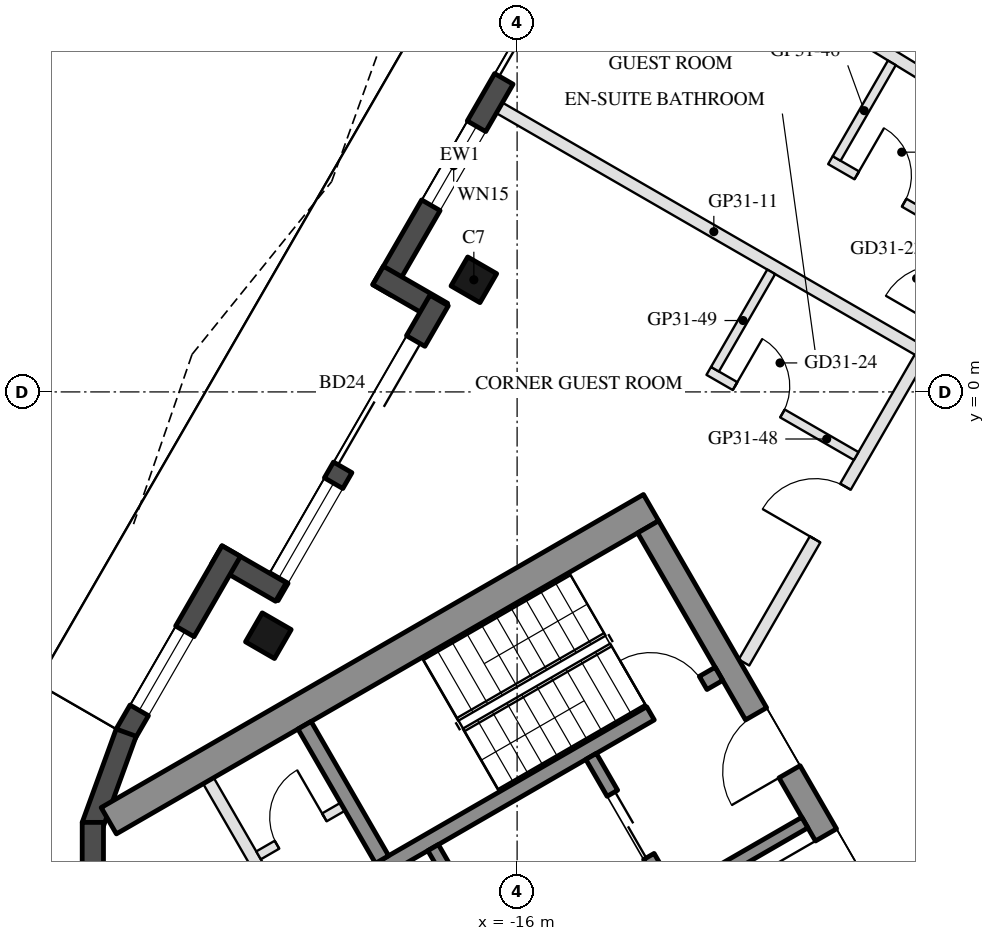
"""IFC4 building model, lengths in metres.
Left out: names, types, materials, properties, quantities, classifications, styles, units other than length and angle.
Written with IfcOpenShell. Run it as: python <this file> out.ifc"""

import sys

from ifc_helpers import new_model, si_unit, direction, frame, frame_2d, origin, origin_2d, place, context, subcontext, project, spatial, rectangle, hollow_rectangle, extrude, boolean, halfspace, element, fill, save


model = new_model("IFC4")
c1 = context("Model", 3, precision=1e-05, world=origin(), true_north=direction((0.0, 1.0)))
c2 = subcontext(c1, "Body", "Model", "MODEL_VIEW")
j1 = project(units=[si_unit("LENGTHUNIT", "METRE"), si_unit("PLANEANGLEUNIT", "RADIAN")], contexts=[c1])
p1 = place(None, origin())
s1 = spatial("IfcSite", under=j1, at=p1, CompositionType="ELEMENT")
p2 = place(p1, origin())
s2 = spatial("IfcBuilding", under=s1, at=p2, CompositionType="ELEMENT")
p3 = place(p2, frame((0.0, 0.0, 305.9)))
s3 = spatial("IfcBuildingStorey", under=s2, at=p3, CompositionType="ELEMENT", Elevation=305.9)
p4 = place(p3, frame((-16.711, 1.844, 0.0), z_axis=(0.0, 0.0, 1.0), x_axis=(0.5, 0.866025403784, 0.0)))
e1 = element("IfcColumn", 1, at=p4, inside=s3, PredefinedType="COLUMN", context=c2, shape_type="SweptSolid", body=[
    boolean("DIFFERENCE", extrude(hollow_rectangle(XDim=0.55, YDim=0.55, WallThickness=0.025, at=origin_2d()), origin(), (0.0, 0.0, 1.0), 3.7), halfspace(frame((0.0, 0.0, 3.666), z_axis=(0.0, 0.0, 1.0), x_axis=(1.0, 0.0, 0.0)), False)),
])
p5 = place(p3, frame((-20.091, -4.01, 0.0), z_axis=(0.0, 0.0, 1.0), x_axis=(0.5, 0.866025403784, 0.0)))
e2 = element("IfcColumn", 2, at=p5, inside=s3, PredefinedType="COLUMN", context=c2, shape_type="SweptSolid", body=[
    boolean("DIFFERENCE", extrude(hollow_rectangle(XDim=0.55, YDim=0.55, WallThickness=0.025, at=origin_2d()), origin(), (0.0, 0.0, 1.0), 3.7), halfspace(frame((0.0, 0.0, 3.66), z_axis=(0.0, 0.0, 1.0), x_axis=(1.0, 0.0, 0.0)), False)),
])
p6 = place(p3, frame((-13.943, 9.089, 0.0), z_axis=(0.0, 0.0, 1.0), x_axis=(-0.500013816581, -0.866017426631, 0.0)))
e3 = element("IfcWall", 3, at=p6, inside=s3, PredefinedType="SOLIDWALL", context=c2, shape_type="SweptSolid", body=[
    extrude(rectangle(XDim=8.559, YDim=0.35, at=frame_2d((4.279, 0.0))), origin(), (0.0, 0.0, 1.0), 3.55),
])
p7 = place(p6, frame((2.75, 0.0, 0.0)))
e4 = element("IfcOpeningElement", 4, at=p7, cuts=e3, PredefinedType="OPENING", context=c2, shape_type="SweptSolid", body=[
    extrude(rectangle(XDim=1.8, YDim=2.4, at=frame_2d((0.9, 1.2))), frame((0.0, 0.185, 0.0), z_axis=(0.0, -1.0, 0.0), x_axis=(1.0, 0.0, 0.0)), (0.0, 0.0, 1.0), 0.37),
])
p8 = place(p6, frame((1.525, 0.0, 0.3)))
e5 = element("IfcOpeningElement", 5, at=p8, cuts=e3, PredefinedType="OPENING", context=c2, shape_type="SweptSolid", body=[
    extrude(rectangle(XDim=0.9, YDim=2.65, at=frame_2d((0.45, 1.325))), frame((0.0, 0.185, 0.0), z_axis=(0.0, -1.0, 0.0), x_axis=(1.0, 0.0, 0.0)), (0.0, 0.0, 1.0), 0.37),
])
p9 = place(p6, frame((5.45, 0.0, 0.3)))
e6 = element("IfcOpeningElement", 6, at=p9, cuts=e3, PredefinedType="OPENING", context=c2, shape_type="SweptSolid", body=[
    extrude(rectangle(XDim=1.5, YDim=2.65, at=frame_2d((0.75, 1.325))), frame((0.0, 0.185, 0.0), z_axis=(0.0, -1.0, 0.0), x_axis=(1.0, 0.0, 0.0)), (0.0, 0.0, 1.0), 0.37),
])
p10 = place(p3, frame((-18.287, 1.916, 0.0), z_axis=(0.0, 0.0, 1.0), x_axis=(0.866142280446, -0.499797509021, 0.0)))
e7 = element("IfcWall", 7, at=p10, inside=s3, PredefinedType="SOLIDWALL", context=c2, shape_type="SweptSolid", body=[
    extrude(rectangle(XDim=1.22, YDim=0.35, at=frame_2d((0.61, 0.0))), origin(), (0.0, 0.0, 1.0), 3.55),
])
p11 = place(p3, frame((-17.283, 1.504, 0.0), z_axis=(0.0, 0.0, 1.0), x_axis=(-0.500008054862, -0.866020753258, 0.0)))
e8 = element("IfcWall", 8, at=p11, inside=s3, PredefinedType="SOLIDWALL", context=c2, shape_type="SweptSolid", body=[
    extrude(rectangle(XDim=5.599, YDim=0.35, at=frame_2d((2.8, 0.0))), origin(), (0.0, 0.0, 1.0), 3.55),
])
p12 = place(p11, frame((0.77, 0.0, 0.0)))
e9 = element("IfcOpeningElement", 9, at=p12, cuts=e8, PredefinedType="OPENING", context=c2, shape_type="SweptSolid", body=[
    extrude(rectangle(XDim=2.4, YDim=2.4, at=frame_2d((1.2, 1.2))), frame((0.0, 0.185, 0.0), z_axis=(0.0, -1.0, 0.0), x_axis=(1.0, 0.0, 0.0)), (0.0, 0.0, 1.0), 0.37),
])
p13 = place(p11, frame((3.47, 0.0, 0.3)))
e10 = element("IfcOpeningElement", 10, at=p13, cuts=e8, PredefinedType="OPENING", context=c2, shape_type="SweptSolid", body=[
    extrude(rectangle(XDim=1.8, YDim=2.65, at=frame_2d((0.9, 1.325))), frame((0.0, 0.185, 0.0), z_axis=(0.0, -1.0, 0.0), x_axis=(1.0, 0.0, 0.0)), (0.0, 0.0, 1.0), 0.37),
])
p14 = place(p3, frame((-19.884, -3.292, 0.0), z_axis=(0.0, 0.0, 1.0), x_axis=(-0.866005645448, 0.500034220881, 0.0)))
e11 = element("IfcWall", 11, at=p14, inside=s3, PredefinedType="SOLIDWALL", context=c2, shape_type="SweptSolid", body=[
    extrude(rectangle(XDim=1.22, YDim=0.35, at=frame_2d((0.61, 0.0))), origin(), (0.0, 0.0, 1.0), 3.55),
])
p15 = place(p3, frame((-20.702, -2.618, 0.0), z_axis=(0.0, 0.0, 1.0), x_axis=(-0.499979528911, -0.866037222451, 0.0)))
e12 = element("IfcWall", 12, at=p15, inside=s3, PredefinedType="SOLIDWALL", context=c2, shape_type="SweptSolid", body=[
    extrude(rectangle(XDim=3.48, YDim=0.35, at=frame_2d((1.74, 0.0))), origin(), (0.0, 0.0, 1.0), 3.55),
])
p16 = place(p15, frame((1.525, 0.0, 0.3)))
e13 = element("IfcOpeningElement", 13, at=p16, cuts=e12, PredefinedType="OPENING", context=c2, shape_type="SweptSolid", body=[
    extrude(rectangle(XDim=1.5, YDim=2.65, at=frame_2d((0.75, 1.325))), frame((0.0, 0.185, 0.0), z_axis=(0.0, -1.0, 0.0), x_axis=(1.0, 0.0, 0.0)), (0.0, 0.0, 1.0), 0.37),
])
for number, where, z_axis, x_axis in (
    (14, (-22.429, -5.604, 0.0), (0.0, 0.0, 1.0), (-0.342, -0.94, 0.0)),
    (15, (-22.977, -7.08, 0.0), (0.0, 0.0, 1.0), (0.0, -1.0, 0.0)),
):
    element("IfcWall", number, at=place(p3, frame(where, z_axis=z_axis, x_axis=x_axis)), inside=s3, PredefinedType="SOLIDWALL", context=c2, shape_type="SweptSolid", body=[
        extrude(rectangle(XDim=1.634, YDim=0.35, at=frame_2d((0.817, 0.0))), origin(), (0.0, 0.0, 1.0), 3.55),
    ])
p17 = place(p3, frame((-13.797, -1.903, 0.0), z_axis=(0.0, 0.0, 1.0), x_axis=(-0.866027279078, -0.499996751883, 0.0)))
e16 = element("IfcWall", 16, at=p17, inside=s3, PredefinedType="SHEAR", context=c2, shape_type="SweptSolid", body=[
    extrude(rectangle(XDim=10.298, YDim=0.5, at=frame_2d((5.149, 0.0))), origin(), (0.0, 0.0, 1.0), 3.5),
])
p18 = place(p3, frame((-13.845, -2.22, 0.0), z_axis=(0.0, 0.0, 1.0), x_axis=(0.500004234368, -0.866022959057, 0.0)))
e17 = element("IfcWall", 17, at=p18, inside=s3, PredefinedType="SHEAR", context=c2, shape_type="SweptSolid", body=[
    extrude(rectangle(XDim=10.0, YDim=0.4, at=frame_2d((5.0, 0.0))), origin(), (0.0, 0.0, 1.0), 3.5),
])
p19 = place(p18, frame((3.55, 0.0, 0.0)))
e18 = element("IfcOpeningElement", 18, at=p19, cuts=e17, PredefinedType="OPENING", context=c2, shape_type="SweptSolid", body=[
    extrude(rectangle(XDim=1.1, YDim=2.1, at=frame_2d((0.55, 1.05))), frame((0.0, 0.21, 0.0), z_axis=(0.0, -1.0, 0.0), x_axis=(1.0, 0.0, 0.0)), (0.0, 0.0, 1.0), 0.42),
])
p20 = place(p18, frame((5.85, 0.0, 0.0)))
e19 = element("IfcOpeningElement", 19, at=p20, cuts=e17, PredefinedType="OPENING", context=c2, shape_type="SweptSolid", body=[
    extrude(rectangle(XDim=1.4, YDim=2.1, at=frame_2d((0.7, 1.05))), frame((0.0, 0.21, 0.0), z_axis=(0.0, -1.0, 0.0), x_axis=(1.0, 0.0, 0.0)), (0.0, 0.0, 1.0), 0.42),
])
p21 = place(p3, frame((-12.681, -4.636, 0.0), z_axis=(0.0, 0.0, 1.0), x_axis=(-0.866021702275, -0.500006411147, 0.0)))
e20 = element("IfcWall", 20, at=p21, inside=s3, PredefinedType="SHEAR", context=c2, shape_type="SweptSolid", body=[
    extrude(rectangle(XDim=6.45, YDim=0.25, at=frame_2d((3.225, 0.0))), origin(), (0.0, 0.0, 1.0), 3.5),
])
p22 = place(p21, frame((0.3, 0.0, 0.0)))
e21 = element("IfcOpeningElement", 21, at=p22, cuts=e20, PredefinedType="OPENING", context=c2, shape_type="SweptSolid", body=[
    extrude(rectangle(XDim=1.0, YDim=2.1, at=frame_2d((0.5, 1.05))), frame((0.0, 0.135, 0.0), z_axis=(0.0, -1.0, 0.0), x_axis=(1.0, 0.0, 0.0)), (0.0, 0.0, 1.0), 0.27),
])
p23 = place(p3, frame((-19.496, -5.482, 0.0), z_axis=(0.0, 0.0, 1.0), x_axis=(0.499990435942, -0.866030925526, 0.0)))
e22 = element("IfcWall", 22, at=p23, inside=s3, PredefinedType="SHEAR", context=c2, shape_type="SweptSolid", body=[
    extrude(rectangle(XDim=2.55, YDim=0.25, at=frame_2d((1.275, 0.0))), origin(), (0.0, 0.0, 1.0), 3.5),
])
p24 = place(p3, frame((-17.381, -7.495, 0.0), z_axis=(0.0, 0.0, 1.0), x_axis=(0.500011755427, -0.866018616679, 0.0)))
e23 = element("IfcWall", 23, at=p24, inside=s3, PredefinedType="SHEAR", context=c2, shape_type="SweptSolid", body=[
    extrude(rectangle(XDim=2.8, YDim=0.2, at=frame_2d((1.4, 0.0))), origin(), (0.0, 0.0, 1.0), 3.5),
])
p25 = place(p3, frame((-14.783, -5.995, 0.0), z_axis=(0.0, 0.0, 1.0), x_axis=(0.49994636267, -0.866056369097, 0.0)))
e24 = element("IfcWall", 24, at=p25, inside=s3, PredefinedType="SHEAR", context=c2, shape_type="SweptSolid", body=[
    extrude(rectangle(XDim=2.8, YDim=0.2, at=frame_2d((1.4, 0.0))), origin(), (0.0, 0.0, 1.0), 3.5),
])
p26 = place(p25, frame((0.7, 0.0, 0.0)))
e25 = element("IfcOpeningElement", 25, at=p26, cuts=e24, PredefinedType="OPENING", context=c2, shape_type="SweptSolid", body=[
    extrude(rectangle(XDim=1.2, YDim=2.1, at=frame_2d((0.6, 1.05))), frame((0.0, 0.11, 0.0), z_axis=(0.0, -1.0, 0.0), x_axis=(1.0, 0.0, 0.0)), (0.0, 0.0, 1.0), 0.22),
])
p27 = place(p3, frame((-11.268, -7.083, 0.0), z_axis=(0.0, 0.0, 1.0), x_axis=(-0.866050077142, -0.499957262057, 0.0)))
e26 = element("IfcWall", 26, at=p27, inside=s3, PredefinedType="SHEAR", context=c2, shape_type="SweptSolid", body=[
    extrude(rectangle(XDim=2.4, YDim=0.2, at=frame_2d((1.2, 0.0))), origin(), (0.0, 0.0, 1.0), 3.5),
])
p28 = place(p3, frame((-21.076, -6.395, 0.0), z_axis=(0.0, 0.0, 1.0), x_axis=(0.50001468107, -0.866016927499, 0.0)))
e27 = element("IfcWall", 27, at=p28, inside=s3, PredefinedType="PARTITIONING", context=c2, shape_type="SweptSolid", body=[
    extrude(rectangle(XDim=5.4, YDim=0.2, at=frame_2d((2.7, 0.0))), origin(), (0.0, 0.0, 1.0), 3.5),
])
p29 = place(p28, frame((2.9, 0.0, 0.0)))
e28 = element("IfcOpeningElement", 28, at=p29, cuts=e27, PredefinedType="OPENING", context=c2, shape_type="SweptSolid", body=[
    extrude(rectangle(XDim=0.9, YDim=2.1, at=frame_2d((0.45, 1.05))), frame((0.0, 0.11, 0.0), z_axis=(0.0, -1.0, 0.0), x_axis=(1.0, 0.0, 0.0)), (0.0, 0.0, 1.0), 0.22),
])
p30 = place(p3, frame((-18.866, -6.822, 0.0), z_axis=(0.0, 0.0, 1.0), x_axis=(-0.866028054938, -0.499995408039, 0.0)))
e29 = element("IfcWall", 29, at=p30, inside=s3, PredefinedType="PARTITIONING", context=c2, shape_type="SweptSolid", body=[
    extrude(rectangle(XDim=1.6, YDim=0.15, at=frame_2d((0.8, 0.0))), origin(), (0.0, 0.0, 1.0), 3.5),
])
p31 = place(p30, frame((0.35, 0.0, 0.0)))
e30 = element("IfcOpeningElement", 30, at=p31, cuts=e29, PredefinedType="OPENING", context=c2, shape_type="SweptSolid", body=[
    extrude(rectangle(XDim=0.9, YDim=2.1, at=frame_2d((0.45, 1.05))), frame((0.0, 0.085, 0.0), z_axis=(0.0, -1.0, 0.0), x_axis=(1.0, 0.0, 0.0)), (0.0, 0.0, 1.0), 0.17),
])
p32 = place(p3, frame((-13.111, 7.531, 0.0), z_axis=(0.0, 0.0, 1.0), x_axis=(0.853158842711, -0.521651214034, 0.0)))
e31 = element("IfcWall", 31, at=p32, inside=s3, PredefinedType="PARTITIONING", context=c2, shape_type="SweptSolid", body=[
    extrude(rectangle(XDim=6.822, YDim=0.2, at=frame_2d((3.411, 0.0))), origin(), (0.0, 0.0, 1.0), 3.1),
])
p33 = place(p3, frame((-16.292, 4.672, 0.0), z_axis=(0.0, 0.0, 1.0), x_axis=(0.866028345359, -0.499994905008, 0.0)))
e32 = element("IfcWall", 32, at=p33, inside=s3, PredefinedType="PARTITIONING", context=c2, shape_type="SweptSolid", body=[
    extrude(rectangle(XDim=8.145, YDim=0.2, at=frame_2d((4.072, 0.0))), origin(), (0.0, 0.0, 1.0), 3.1),
])
p34 = place(p3, frame((-10.847, 3.812, 0.0), z_axis=(0.0, 0.0, 1.0), x_axis=(0.865996816683, -0.500049511043, 0.0)))
e33 = element("IfcWall", 33, at=p34, inside=s3, PredefinedType="PARTITIONING", context=c2, shape_type="SweptSolid", body=[
    extrude(rectangle(XDim=2.8, YDim=0.15, at=frame_2d((1.4, 0.0))), origin(), (0.0, 0.0, 1.0), 3.55),
])
p35 = place(p34, frame((0.5, 0.0, 0.0)))
e34 = element("IfcOpeningElement", 34, at=p35, cuts=e33, PredefinedType="OPENING", context=c2, shape_type="SweptSolid", body=[
    extrude(rectangle(XDim=0.9, YDim=2.1, at=frame_2d((0.45, 1.05))), frame((0.0, 0.085, 0.0), z_axis=(0.0, -1.0, 0.0), x_axis=(1.0, 0.0, 0.0)), (0.0, 0.0, 1.0), 0.17),
])
p36 = place(p3, frame((-9.837, 5.412, 0.0), z_axis=(0.0, 0.0, 1.0), x_axis=(-0.499970715924, -0.866042310294, 0.0)))
e35 = element("IfcWall", 35, at=p36, inside=s3, PredefinedType="PARTITIONING", context=c2, shape_type="SweptSolid", body=[
    extrude(rectangle(XDim=1.816, YDim=0.15, at=frame_2d((0.908, 0.0))), origin(), (0.0, 0.0, 1.0), 3.55),
])
p37 = place(p3, frame((-12.269, -4.45, 0.0), z_axis=(0.0, 0.0, 1.0), x_axis=(0.50002670742, 0.866009983699, 0.0)))
e36 = element("IfcWall", 36, at=p37, inside=s3, PredefinedType="PARTITIONING", context=c2, shape_type="SweptSolid", body=[
    extrude(rectangle(XDim=5.788, YDim=0.2, at=frame_2d((2.894, 0.0))), origin(), (0.0, 0.0, 1.0), 3.1),
])
p38 = place(p37, frame((2.338, 0.0, 0.0)))
e37 = element("IfcOpeningElement", 37, at=p38, cuts=e36, PredefinedType="OPENING", context=c2, shape_type="SweptSolid", body=[
    extrude(rectangle(XDim=1.0, YDim=2.1, at=frame_2d((0.5, 1.05))), frame((0.0, 0.11, 0.0), z_axis=(0.0, -1.0, 0.0), x_axis=(1.0, 0.0, 0.0)), (0.0, 0.0, 1.0), 0.22),
])
p39 = place(p3, frame((-12.849, 0.346, 0.0), z_axis=(0.0, 0.0, 1.0), x_axis=(0.866018616679, -0.500011755427, 0.0)))
e38 = element("IfcWall", 38, at=p39, inside=s3, PredefinedType="PARTITIONING", context=c2, shape_type="SweptSolid", body=[
    extrude(rectangle(XDim=2.8, YDim=0.15, at=frame_2d((1.4, 0.0))), origin(), (0.0, 0.0, 1.0), 3.55),
])
p40 = place(p39, frame((0.5, 0.0, 0.0)))
e39 = element("IfcOpeningElement", 39, at=p40, cuts=e38, PredefinedType="OPENING", context=c2, shape_type="SweptSolid", body=[
    extrude(rectangle(XDim=0.9, YDim=2.1, at=frame_2d((0.45, 1.05))), frame((0.0, 0.085, 0.0), z_axis=(0.0, -1.0, 0.0), x_axis=(1.0, 0.0, 0.0)), (0.0, 0.0, 1.0), 0.17),
])
p41 = place(p3, frame((-11.821, 1.975, 0.0), z_axis=(0.0, 0.0, 1.0), x_axis=(-0.500042316284, -0.866000971088, 0.0)))
e40 = element("IfcWall", 40, at=p41, inside=s3, PredefinedType="PARTITIONING", context=c2, shape_type="SweptSolid", body=[
    extrude(rectangle(XDim=1.85, YDim=0.15, at=frame_2d((0.925, 0.0))), origin(), (0.0, 0.0, 1.0), 3.55),
])
p42 = place(p7, frame((1.8, 0.0, 0.0), z_axis=(0.0, 0.0, 1.0), x_axis=(-1.0, 0.0, 0.0)))
e41 = element("IfcDoor", 41, at=p42, inside=s3, OperationType="SLIDING_TO_LEFT", PredefinedType="DOOR", context=c2, shape_type="SweptSolid", body=[
    extrude(rectangle(XDim=1.8, YDim=2.4, at=frame_2d((0.9, 1.2))), frame((0.0, 0.025, 0.0), z_axis=(0.0, -1.0, 0.0), x_axis=(1.0, 0.0, 0.0)), (0.0, 0.0, 1.0), 0.05),
])
fill(e4, e41)
p43 = place(p9, origin())
e42 = element("IfcWindow", 42, at=p43, inside=s3, PartitioningType="SINGLE_PANEL", PredefinedType="WINDOW", context=c2, shape_type="SweptSolid", body=[
    extrude(rectangle(XDim=1.5, YDim=2.65, at=frame_2d((0.75, 1.325))), frame((0.0, 0.03, 0.0), z_axis=(0.0, -1.0, 0.0), x_axis=(1.0, 0.0, 0.0)), (0.0, 0.0, 1.0), 0.06),
])
fill(e6, e42)
p44 = place(p12, frame((2.4, 0.0, 0.0), z_axis=(0.0, 0.0, 1.0), x_axis=(-1.0, 0.0, 0.0)))
e43 = element("IfcDoor", 43, at=p44, inside=s3, OperationType="SLIDING_TO_LEFT", PredefinedType="DOOR", context=c2, shape_type="SweptSolid", body=[
    extrude(rectangle(XDim=2.4, YDim=2.4, at=frame_2d((1.2, 1.2))), frame((0.0, 0.025, 0.0), z_axis=(0.0, -1.0, 0.0), x_axis=(1.0, 0.0, 0.0)), (0.0, 0.0, 1.0), 0.05),
])
fill(e9, e43)
p45 = place(p13, origin())
e44 = element("IfcWindow", 44, at=p45, inside=s3, PartitioningType="SINGLE_PANEL", PredefinedType="WINDOW", context=c2, shape_type="SweptSolid", body=[
    extrude(rectangle(XDim=1.8, YDim=2.65, at=frame_2d((0.9, 1.325))), frame((0.0, 0.03, 0.0), z_axis=(0.0, -1.0, 0.0), x_axis=(1.0, 0.0, 0.0)), (0.0, 0.0, 1.0), 0.06),
])
fill(e10, e44)
p46 = place(p16, origin())
e45 = element("IfcWindow", 45, at=p46, inside=s3, PartitioningType="SINGLE_PANEL", PredefinedType="WINDOW", context=c2, shape_type="SweptSolid", body=[
    extrude(rectangle(XDim=1.5, YDim=2.65, at=frame_2d((0.75, 1.325))), frame((0.0, 0.03, 0.0), z_axis=(0.0, -1.0, 0.0), x_axis=(1.0, 0.0, 0.0)), (0.0, 0.0, 1.0), 0.06),
])
fill(e13, e45)
p47 = place(p26, origin())
e46 = element("IfcDoor", 46, at=p47, inside=s3, OperationType="DOUBLE_DOOR_SLIDING", PredefinedType="DOOR", context=c2, shape_type="SweptSolid", body=[
    extrude(rectangle(XDim=1.2, YDim=2.1, at=frame_2d((0.6, 1.05))), frame((0.0, 0.025, 0.0), z_axis=(0.0, -1.0, 0.0), x_axis=(1.0, 0.0, 0.0)), (0.0, 0.0, 1.0), 0.05),
])
fill(e25, e46)
p48 = place(p31, frame((0.9, 0.0, 0.0), z_axis=(0.0, 0.0, 1.0), x_axis=(-1.0, 0.0, 0.0)))
e47 = element("IfcDoor", 47, at=p48, inside=s3, OperationType="SINGLE_SWING_RIGHT", PredefinedType="DOOR", context=c2, shape_type="SweptSolid", body=[
    extrude(rectangle(XDim=0.9, YDim=2.1, at=frame_2d((0.45, 1.05))), frame((0.0, 0.025, 0.0), z_axis=(0.0, -1.0, 0.0), x_axis=(1.0, 0.0, 0.0)), (0.0, 0.0, 1.0), 0.05),
])
fill(e30, e47)
p49 = place(p19, frame((1.1, 0.0, 0.0), z_axis=(0.0, 0.0, 1.0), x_axis=(-1.0, 0.0, 0.0)))
e48 = element("IfcDoor", 48, at=p49, inside=s3, OperationType="SINGLE_SWING_LEFT", PredefinedType="DOOR", context=c2, shape_type="SweptSolid", body=[
    extrude(rectangle(XDim=1.1, YDim=2.1, at=frame_2d((0.55, 1.05))), frame((0.0, 0.025, 0.0), z_axis=(0.0, -1.0, 0.0), x_axis=(1.0, 0.0, 0.0)), (0.0, 0.0, 1.0), 0.05),
])
fill(e18, e48)
p50 = place(p20, frame((1.4, 0.0, 0.0), z_axis=(0.0, 0.0, 1.0), x_axis=(-1.0, 0.0, 0.0)))
e49 = element("IfcDoor", 49, at=p50, inside=s3, OperationType="DOUBLE_DOOR_SINGLE_SWING", PredefinedType="DOOR", context=c2, shape_type="SweptSolid", body=[
    extrude(rectangle(XDim=1.4, YDim=2.1, at=frame_2d((0.7, 1.05))), frame((0.0, 0.025, 0.0), z_axis=(0.0, -1.0, 0.0), x_axis=(1.0, 0.0, 0.0)), (0.0, 0.0, 1.0), 0.05),
])
fill(e19, e49)
p51 = place(p22, frame((1.0, 0.0, 0.0), z_axis=(0.0, 0.0, 1.0), x_axis=(-1.0, 0.0, 0.0)))
e50 = element("IfcDoor", 50, at=p51, inside=s3, OperationType="SINGLE_SWING_LEFT", PredefinedType="DOOR", context=c2, shape_type="SweptSolid", body=[
    extrude(rectangle(XDim=1.0, YDim=2.1, at=frame_2d((0.5, 1.05))), frame((0.0, 0.025, 0.0), z_axis=(0.0, -1.0, 0.0), x_axis=(1.0, 0.0, 0.0)), (0.0, 0.0, 1.0), 0.05),
])
fill(e21, e50)
p52 = place(p35, origin())
e51 = element("IfcDoor", 51, at=p52, inside=s3, OperationType="SINGLE_SWING_LEFT", PredefinedType="DOOR", context=c2, shape_type="SweptSolid", body=[
    extrude(rectangle(XDim=0.9, YDim=2.1, at=frame_2d((0.45, 1.05))), frame((0.0, 0.025, 0.0), z_axis=(0.0, -1.0, 0.0), x_axis=(1.0, 0.0, 0.0)), (0.0, 0.0, 1.0), 0.05),
])
fill(e34, e51)
p53 = place(p40, origin())
e52 = element("IfcDoor", 52, at=p53, inside=s3, OperationType="SINGLE_SWING_LEFT", PredefinedType="DOOR", context=c2, shape_type="SweptSolid", body=[
    extrude(rectangle(XDim=0.9, YDim=2.1, at=frame_2d((0.45, 1.05))), frame((0.0, 0.025, 0.0), z_axis=(0.0, -1.0, 0.0), x_axis=(1.0, 0.0, 0.0)), (0.0, 0.0, 1.0), 0.05),
])
fill(e39, e52)
p54 = place(p38, origin())
e53 = element("IfcDoor", 53, at=p54, inside=s3, OperationType="SINGLE_SWING_LEFT", PredefinedType="DOOR", context=c2, shape_type="SweptSolid", body=[
    extrude(rectangle(XDim=1.0, YDim=2.1, at=frame_2d((0.5, 1.05))), frame((0.0, 0.025, 0.0), z_axis=(0.0, -1.0, 0.0), x_axis=(1.0, 0.0, 0.0)), (0.0, 0.0, 1.0), 0.05),
])
fill(e37, e53)
save(model, sys.argv[1])
